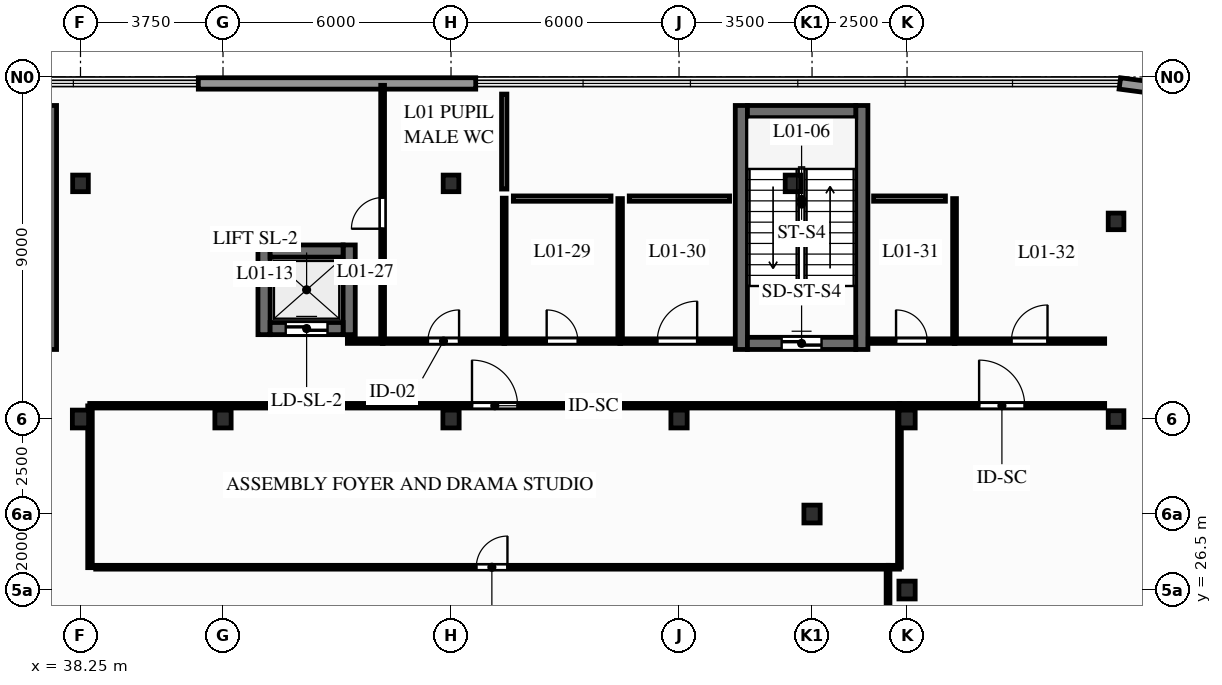
"""IFC4 building model, lengths in metres.
Left out: names, types, materials, properties, quantities, classifications, styles, units other than length and angle.
Written with IfcOpenShell. Run it as: python <this file> out.ifc"""

import sys

from ifc_helpers import new_model, si_unit, direction, frame, frame_2d, origin, origin_2d, place, context, subcontext, project, spatial, rectangle, i_section, extrude, element, fill, save


model = new_model("IFC4")
c1 = context("Model", 3, precision=1e-05, world=origin(), true_north=direction((0.0, 1.0)))
c2 = subcontext(c1, "Body", "Model", "MODEL_VIEW")
j1 = project(units=[si_unit("LENGTHUNIT", "METRE"), si_unit("PLANEANGLEUNIT", "RADIAN")], contexts=[c1])
p1 = place(None, origin())
s1 = spatial("IfcSite", under=j1, at=p1, CompositionType="ELEMENT")
p2 = place(p1, origin())
s2 = spatial("IfcBuilding", under=s1, at=p2, CompositionType="ELEMENT")
p3 = place(p2, frame((0.0, 0.0, 4.5)))
s3 = spatial("IfcBuildingStorey", under=s2, at=p3, CompositionType="ELEMENT", Elevation=4.5)
p4 = place(p3, frame((38.25, 31.0, 0.0), z_axis=(0.0, 0.0, 1.0), x_axis=(1.0, 0.0, 0.0)))
e1 = element("IfcColumn", 1, at=p4, inside=s3, PredefinedType="COLUMN", context=c2, shape_type="SweptSolid", body=[
    extrude(i_section(OverallWidth=0.428, OverallDepth=0.469, WebThickness=0.078, FlangeThickness=0.125, FilletRadius=0.015, at=origin_2d()), origin(), (0.0, 0.0, 1.0), 4.5),
])
p5 = place(p3, frame((38.25, 37.2, 0.0), z_axis=(0.0, 0.0, 1.0), x_axis=(1.0, 0.0, 0.0)))
e2 = element("IfcColumn", 2, at=p5, inside=s3, PredefinedType="COLUMN", context=c2, shape_type="SweptSolid", body=[
    extrude(i_section(OverallWidth=0.412, OverallDepth=0.437, WebThickness=0.036, FlangeThickness=0.058, FilletRadius=0.015, at=origin_2d()), origin(), (0.0, 0.0, 1.0), 4.5),
])
for number, where, z_axis, x_axis in (
    (3, (42.0, 31.0, 0.0), (0.0, 0.0, 1.0), (1.0, 0.0, 0.0)),
    (4, (48.0, 31.0, 0.0), (0.0, 0.0, 1.0), (1.0, 0.0, 0.0)),
):
    element("IfcColumn", number, at=place(p3, frame(where, z_axis=z_axis, x_axis=x_axis)), inside=s3, PredefinedType="COLUMN", context=c2, shape_type="SweptSolid", body=[
        extrude(i_section(OverallWidth=0.428, OverallDepth=0.469, WebThickness=0.078, FlangeThickness=0.125, FilletRadius=0.015, at=origin_2d()), origin(), (0.0, 0.0, 1.0), 4.5),
    ])
p6 = place(p3, frame((48.0, 37.2, 0.0), z_axis=(0.0, 0.0, 1.0), x_axis=(1.0, 0.0, 0.0)))
e5 = element("IfcColumn", 5, at=p6, inside=s3, PredefinedType="COLUMN", context=c2, shape_type="SweptSolid", body=[
    extrude(i_section(OverallWidth=0.412, OverallDepth=0.437, WebThickness=0.036, FlangeThickness=0.058, FilletRadius=0.015, at=origin_2d()), origin(), (0.0, 0.0, 1.0), 4.5),
])
p7 = place(p3, frame((54.0, 31.0, 0.0), z_axis=(0.0, 0.0, 1.0), x_axis=(1.0, 0.0, 0.0)))
e6 = element("IfcColumn", 6, at=p7, inside=s3, PredefinedType="COLUMN", context=c2, shape_type="SweptSolid", body=[
    extrude(i_section(OverallWidth=0.428, OverallDepth=0.469, WebThickness=0.078, FlangeThickness=0.125, FilletRadius=0.015, at=origin_2d()), origin(), (0.0, 0.0, 1.0), 4.5),
])
p8 = place(p3, frame((57.0, 37.2, 0.0), z_axis=(0.0, 0.0, 1.0), x_axis=(1.0, 0.0, 0.0)))
e7 = element("IfcColumn", 7, at=p8, inside=s3, PredefinedType="COLUMN", context=c2, shape_type="SweptSolid", body=[
    extrude(i_section(OverallWidth=0.412, OverallDepth=0.437, WebThickness=0.036, FlangeThickness=0.058, FilletRadius=0.015, at=origin_2d()), origin(), (0.0, 0.0, 1.0), 4.5),
])
for number, where, z_axis, x_axis in (
    (8, (57.5, 28.5, 0.0), (0.0, 0.0, 1.0), (1.0, 0.0, 0.0)),
    (9, (60.0, 26.5, 0.0), (0.0, 0.0, 1.0), (1.0, 0.0, 0.0)),
    (10, (60.0, 31.0, 0.0), (0.0, 0.0, 1.0), (1.0, 0.0, 0.0)),
):
    element("IfcColumn", number, at=place(p3, frame(where, z_axis=z_axis, x_axis=x_axis)), inside=s3, PredefinedType="COLUMN", context=c2, shape_type="SweptSolid", body=[
        extrude(i_section(OverallWidth=0.428, OverallDepth=0.469, WebThickness=0.078, FlangeThickness=0.125, FilletRadius=0.015, at=origin_2d()), origin(), (0.0, 0.0, 1.0), 4.5),
    ])
for number, where, z_axis, x_axis in (
    (11, (65.5, 31.0, 0.0), (0.0, 0.0, 1.0), (1.0, 0.0, 0.0)),
    (12, (65.5, 36.2, 0.0), (0.0, 0.0, 1.0), (1.0, 0.0, 0.0)),
):
    element("IfcColumn", number, at=place(p3, frame(where, z_axis=z_axis, x_axis=x_axis)), inside=s3, PredefinedType="COLUMN", context=c2, shape_type="SweptSolid", body=[
        extrude(i_section(OverallWidth=0.412, OverallDepth=0.437, WebThickness=0.036, FlangeThickness=0.058, FilletRadius=0.015, at=origin_2d()), origin(), (0.0, 0.0, 1.0), 4.5),
    ])
p9 = place(p3, frame((65.6, 39.83, 0.0), z_axis=(0.0, 0.0, 1.0), x_axis=(0.991442117533, -0.13054703207, 0.0)))
e13 = element("IfcWall", 13, at=p9, inside=s3, PredefinedType="STANDARD", context=c2, shape_type="SweptSolid", body=[
    extrude(rectangle(XDim=1.365, YDim=0.3, at=frame_2d((0.683, 0.0))), origin(), (0.0, 0.0, 1.0), 4.22),
])
p10 = place(p3, frame((41.35, 39.83, 0.0), z_axis=(0.0, 0.0, 1.0), x_axis=(1.0, 0.0, 0.0)))
e14 = element("IfcWall", 14, at=p10, inside=s3, PredefinedType="STANDARD", context=c2, shape_type="SweptSolid", body=[
    extrude(rectangle(XDim=7.3, YDim=0.3, at=frame_2d((3.65, 0.0))), origin(), (0.0, 0.0, 1.0), 4.22),
])
for number, where, z_axis, x_axis in (
    (15, (37.46, 32.83, 0.0), (0.0, 0.0, 1.0), (0.0, 1.0, 0.0)),
    (16, (55.64, 32.83, 0.0), (0.0, 0.0, 1.0), (0.0, 1.0, 0.0)),
    (17, (58.81, 32.83, 0.0), (0.0, 0.0, 1.0), (0.0, 1.0, 0.0)),
):
    element("IfcWall", number, at=place(p3, frame(where, z_axis=z_axis, x_axis=x_axis)), inside=s3, PredefinedType="SHEAR", context=c2, shape_type="SweptSolid", body=[
        extrude(rectangle(XDim=6.42, YDim=0.32, at=frame_2d((3.21, 0.0))), origin(), (0.0, 0.0, 1.0), 4.22),
    ])
p11 = place(p3, frame((55.8, 32.99, 0.0), z_axis=(0.0, 0.0, 1.0), x_axis=(1.0, 0.0, 0.0)))
e18 = element("IfcWall", 18, at=p11, inside=s3, PredefinedType="SHEAR", context=c2, shape_type="SweptSolid", body=[
    extrude(rectangle(XDim=2.85, YDim=0.32, at=frame_2d((1.425, 0.0))), origin(), (0.0, 0.0, 1.0), 4.22),
])
p12 = place(p11, frame((0.9, 0.0, 0.0)))
e19 = element("IfcOpeningElement", 19, at=p12, cuts=e18, PredefinedType="OPENING", context=c2, shape_type="SweptSolid", body=[
    extrude(rectangle(XDim=1.05, YDim=2.06, at=frame_2d((0.525, 1.03))), frame((0.0, 0.17, 0.0), z_axis=(0.0, -1.0, 0.0), x_axis=(1.0, 0.0, 0.0)), (0.0, 0.0, 1.0), 0.34),
])
p13 = place(p3, frame((58.65, 39.09, 0.0), z_axis=(0.0, 0.0, 1.0), x_axis=(-1.0, 0.0, 0.0)))
e20 = element("IfcWall", 20, at=p13, inside=s3, PredefinedType="SHEAR", context=c2, shape_type="SweptSolid", body=[
    extrude(rectangle(XDim=2.85, YDim=0.32, at=frame_2d((1.425, 0.0))), origin(), (0.0, 0.0, 1.0), 4.22),
])
for number, where, z_axis, x_axis in (
    (21, (43.08, 33.22, 0.0), (0.0, 0.0, 1.0), (0.0, 1.0, 0.0)),
    (22, (45.32, 33.22, 0.0), (0.0, 0.0, 1.0), (0.0, 1.0, 0.0)),
):
    element("IfcWall", number, at=place(p3, frame(where, z_axis=z_axis, x_axis=x_axis)), inside=s3, PredefinedType="SHEAR", context=c2, shape_type="SweptSolid", body=[
        extrude(rectangle(XDim=2.36, YDim=0.32, at=frame_2d((1.18, 0.0))), origin(), (0.0, 0.0, 1.0), 4.22),
    ])
p14 = place(p3, frame((43.24, 33.38, 0.0), z_axis=(0.0, 0.0, 1.0), x_axis=(1.0, 0.0, 0.0)))
e23 = element("IfcWall", 23, at=p14, inside=s3, PredefinedType="SHEAR", context=c2, shape_type="SweptSolid", body=[
    extrude(rectangle(XDim=1.92, YDim=0.32, at=frame_2d((0.96, 0.0))), origin(), (0.0, 0.0, 1.0), 4.22),
])
p15 = place(p14, frame((0.41, 0.0, 0.0)))
e24 = element("IfcOpeningElement", 24, at=p15, cuts=e23, PredefinedType="OPENING", context=c2, shape_type="SweptSolid", body=[
    extrude(rectangle(XDim=1.1, YDim=2.06, at=frame_2d((0.55, 1.03))), frame((0.0, 0.17, 0.0), z_axis=(0.0, -1.0, 0.0), x_axis=(1.0, 0.0, 0.0)), (0.0, 0.0, 1.0), 0.34),
])
p16 = place(p3, frame((43.24, 35.42, 0.0), z_axis=(0.0, 0.0, 1.0), x_axis=(1.0, 0.0, 0.0)))
e25 = element("IfcWall", 25, at=p16, inside=s3, PredefinedType="SHEAR", context=c2, shape_type="SweptSolid", body=[
    extrude(rectangle(XDim=1.92, YDim=0.32, at=frame_2d((0.96, 0.0))), origin(), (0.0, 0.0, 1.0), 4.22),
])
p17 = place(p3, frame((45.273, 33.05, 0.0), z_axis=(0.0, 0.0, 1.0), x_axis=(1.0, 0.0, 0.0)))
e26 = element("IfcWall", 26, at=p17, inside=s3, PredefinedType="PARTITIONING", context=c2, shape_type="SweptSolid", body=[
    extrude(rectangle(XDim=0.938, YDim=0.12, at=frame_2d((0.469, 0.0))), origin(), (0.0, 0.0, 1.0), 4.22),
])
p18 = place(p3, frame((46.193, 33.05, 0.0), z_axis=(0.0, 0.0, 1.0), x_axis=(1.0, 0.0, 0.0)))
e27 = element("IfcWall", 27, at=p18, inside=s3, PredefinedType="PARTITIONING", context=c2, shape_type="SweptSolid", body=[
    extrude(rectangle(XDim=3.219, YDim=0.12, at=frame_2d((1.609, 0.0))), origin(), (0.0, 0.0, 1.0), 3.268),
])
p19 = place(p18, frame((1.199, 0.0, 0.0)))
e28 = element("IfcOpeningElement", 28, at=p19, cuts=e27, PredefinedType="OPENING", context=c2, shape_type="SweptSolid", body=[
    extrude(rectangle(XDim=0.82, YDim=2.02, at=frame_2d((0.41, 1.01))), frame((0.0, 0.07, 0.0), z_axis=(0.0, -1.0, 0.0), x_axis=(1.0, 0.0, 0.0)), (0.0, 0.0, 1.0), 0.14),
])
p20 = place(p3, frame((49.393, 33.05, 0.0), z_axis=(0.0, 0.0, 1.0), x_axis=(1.0, 0.0, 0.0)))
e29 = element("IfcWall", 29, at=p20, inside=s3, PredefinedType="PARTITIONING", context=c2, shape_type="SweptSolid", body=[
    extrude(rectangle(XDim=3.069, YDim=0.12, at=frame_2d((1.534, 0.0))), origin(), (0.0, 0.0, 1.0), 4.22),
])
p21 = place(p20, frame((1.124, 0.0, 0.0)))
e30 = element("IfcOpeningElement", 30, at=p21, cuts=e29, PredefinedType="OPENING", context=c2, shape_type="SweptSolid", body=[
    extrude(rectangle(XDim=0.82, YDim=2.02, at=frame_2d((0.41, 1.01))), frame((0.0, 0.07, 0.0), z_axis=(0.0, -1.0, 0.0), x_axis=(1.0, 0.0, 0.0)), (0.0, 0.0, 1.0), 0.14),
])
p22 = place(p3, frame((52.443, 33.05, 0.0), z_axis=(0.0, 0.0, 1.0), x_axis=(1.0, 0.0, 0.0)))
e31 = element("IfcWall", 31, at=p22, inside=s3, PredefinedType="PARTITIONING", context=c2, shape_type="SweptSolid", body=[
    extrude(rectangle(XDim=3.019, YDim=0.12, at=frame_2d((1.509, 0.0))), origin(), (0.0, 0.0, 1.0), 4.22),
])
p23 = place(p22, frame((0.984, 0.0, 0.0)))
e32 = element("IfcOpeningElement", 32, at=p23, cuts=e31, PredefinedType="OPENING", context=c2, shape_type="SweptSolid", body=[
    extrude(rectangle(XDim=1.05, YDim=2.06, at=frame_2d((0.525, 1.03))), frame((0.0, 0.07, 0.0), z_axis=(0.0, -1.0, 0.0), x_axis=(1.0, 0.0, 0.0)), (0.0, 0.0, 1.0), 0.14),
])
p24 = place(p3, frame((58.98, 33.05, 0.0), z_axis=(0.0, 0.0, 1.0), x_axis=(1.0, 0.0, 0.0)))
e33 = element("IfcWall", 33, at=p24, inside=s3, PredefinedType="PARTITIONING", context=c2, shape_type="SweptSolid", body=[
    extrude(rectangle(XDim=2.281, YDim=0.12, at=frame_2d((1.141, 0.0))), origin(), (0.0, 0.0, 1.0), 4.22),
])
p25 = place(p24, frame((0.731, 0.0, 0.0)))
e34 = element("IfcOpeningElement", 34, at=p25, cuts=e33, PredefinedType="OPENING", context=c2, shape_type="SweptSolid", body=[
    extrude(rectangle(XDim=0.82, YDim=2.02, at=frame_2d((0.41, 1.01))), frame((0.0, 0.07, 0.0), z_axis=(0.0, -1.0, 0.0), x_axis=(1.0, 0.0, 0.0)), (0.0, 0.0, 1.0), 0.14),
])
p26 = place(p3, frame((61.243, 33.05, 0.0), z_axis=(0.0, 0.0, 1.0), x_axis=(1.0, 0.0, 0.0)))
e35 = element("IfcWall", 35, at=p26, inside=s3, PredefinedType="PARTITIONING", context=c2, shape_type="SweptSolid", body=[
    extrude(rectangle(XDim=3.957, YDim=0.12, at=frame_2d((1.979, 0.0))), origin(), (0.0, 0.0, 1.0), 4.22),
])
p27 = place(p26, frame((1.504, 0.0, 0.0)))
e36 = element("IfcOpeningElement", 36, at=p27, cuts=e35, PredefinedType="OPENING", context=c2, shape_type="SweptSolid", body=[
    extrude(rectangle(XDim=0.95, YDim=2.05, at=frame_2d((0.475, 1.025))), frame((0.0, 0.07, 0.0), z_axis=(0.0, -1.0, 0.0), x_axis=(1.0, 0.0, 0.0)), (0.0, 0.0, 1.0), 0.14),
])
p28 = place(p3, frame((38.493, 31.35, 0.0), z_axis=(0.0, 0.0, 1.0), x_axis=(1.0, 0.0, 0.0)))
e37 = element("IfcWall", 37, at=p28, inside=s3, PredefinedType="PARTITIONING", context=c2, shape_type="SweptSolid", body=[
    extrude(rectangle(XDim=21.319, YDim=0.12, at=frame_2d((10.659, 0.0))), origin(), (0.0, 0.0, 1.0), 3.268),
])
p29 = place(p28, frame((10.059, 0.0, 0.0)))
e38 = element("IfcOpeningElement", 38, at=p29, cuts=e37, PredefinedType="OPENING", context=c2, shape_type="SweptSolid", body=[
    extrude(rectangle(XDim=1.2, YDim=2.08, at=frame_2d((0.6, 1.04))), frame((0.0, 0.07, 0.0), z_axis=(0.0, -1.0, 0.0), x_axis=(1.0, 0.0, 0.0)), (0.0, 0.0, 1.0), 0.14),
])
p30 = place(p3, frame((59.793, 31.35, 0.0), z_axis=(0.0, 0.0, 1.0), x_axis=(1.0, 0.0, 0.0)))
e39 = element("IfcWall", 39, at=p30, inside=s3, PredefinedType="PARTITIONING", context=c2, shape_type="SweptSolid", body=[
    extrude(rectangle(XDim=5.407, YDim=0.12, at=frame_2d((2.704, 0.0))), origin(), (0.0, 0.0, 1.0), 4.22),
])
p31 = place(p30, frame((2.104, 0.0, 0.0)))
e40 = element("IfcOpeningElement", 40, at=p31, cuts=e39, PredefinedType="OPENING", context=c2, shape_type="SweptSolid", body=[
    extrude(rectangle(XDim=1.2, YDim=2.08, at=frame_2d((0.6, 1.04))), frame((0.0, 0.07, 0.0), z_axis=(0.0, -1.0, 0.0), x_axis=(1.0, 0.0, 0.0)), (0.0, 0.0, 1.0), 0.14),
])
p32 = place(p3, frame((38.5, 27.089, 0.0), z_axis=(0.0, 0.0, 1.0), x_axis=(0.0, 1.0, 0.0)))
e41 = element("IfcWall", 41, at=p32, inside=s3, PredefinedType="PARTITIONING", context=c2, shape_type="SweptSolid", body=[
    extrude(rectangle(XDim=4.257, YDim=0.12, at=frame_2d((2.129, 0.0))), origin(), (0.0, 0.0, 1.0), 3.268),
])
p33 = place(p3, frame((46.2, 33.054, 0.0), z_axis=(0.0, 0.0, 1.0), x_axis=(0.0, 1.0, 0.0)))
e42 = element("IfcWall", 42, at=p33, inside=s3, PredefinedType="PARTITIONING", context=c2, shape_type="SweptSolid", body=[
    extrude(rectangle(XDim=6.726, YDim=0.1, at=frame_2d((3.363, 0.0))), origin(), (0.0, 0.0, 1.0), 3.583),
])
p34 = place(p33, frame((2.953, 0.0, 0.0)))
e43 = element("IfcOpeningElement", 43, at=p34, cuts=e42, PredefinedType="OPENING", context=c2, shape_type="SweptSolid", body=[
    extrude(rectangle(XDim=0.82, YDim=2.02, at=frame_2d((0.41, 1.01))), frame((0.0, 0.06, 0.0), z_axis=(0.0, -1.0, 0.0), x_axis=(1.0, 0.0, 0.0)), (0.0, 0.0, 1.0), 0.12),
])
p35 = place(p3, frame((49.4, 33.054, 0.0), z_axis=(0.0, 0.0, 1.0), x_axis=(0.0, 1.0, 0.0)))
e44 = element("IfcWall", 44, at=p35, inside=s3, PredefinedType="PARTITIONING", context=c2, shape_type="SweptSolid", body=[
    extrude(rectangle(XDim=3.757, YDim=0.1, at=frame_2d((1.879, 0.0))), origin(), (0.0, 0.0, 1.0), 4.22),
])
p36 = place(p3, frame((52.45, 33.054, 0.0), z_axis=(0.0, 0.0, 1.0), x_axis=(0.0, 1.0, 0.0)))
e45 = element("IfcWall", 45, at=p36, inside=s3, PredefinedType="PARTITIONING", context=c2, shape_type="SweptSolid", body=[
    extrude(rectangle(XDim=3.746, YDim=0.12, at=frame_2d((1.873, 0.0))), origin(), (0.0, 0.0, 1.0), 4.22),
])
p37 = place(p3, frame((61.25, 33.054, 0.0), z_axis=(0.0, 0.0, 1.0), x_axis=(0.0, 1.0, 0.0)))
e46 = element("IfcWall", 46, at=p37, inside=s3, PredefinedType="PARTITIONING", context=c2, shape_type="SweptSolid", body=[
    extrude(rectangle(XDim=3.746, YDim=0.1, at=frame_2d((1.873, 0.0))), origin(), (0.0, 0.0, 1.0), 4.22),
])
p38 = place(p3, frame((38.65, 27.1, 0.0), z_axis=(0.0, 0.0, 1.0), x_axis=(1.0, 0.0, 0.0)))
e47 = element("IfcWall", 47, at=p38, inside=s3, PredefinedType="PARTITIONING", context=c2, shape_type="SweptSolid", body=[
    extrude(rectangle(XDim=20.85, YDim=0.1, at=frame_2d((10.425, 0.0))), origin(), (0.0, 0.0, 1.0), 4.22),
])
p39 = place(p38, frame((10.015, 0.0, 0.0)))
e48 = element("IfcOpeningElement", 48, at=p39, cuts=e47, PredefinedType="OPENING", context=c2, shape_type="SweptSolid", body=[
    extrude(rectangle(XDim=0.82, YDim=2.02, at=frame_2d((0.41, 1.01))), frame((0.0, 0.06, 0.0), z_axis=(0.0, -1.0, 0.0), x_axis=(1.0, 0.0, 0.0)), (0.0, 0.0, 1.0), 0.12),
])
p40 = place(p3, frame((59.5, 12.6, 0.0), z_axis=(0.0, 0.0, 1.0), x_axis=(0.0, 1.0, 0.0)))
e49 = element("IfcWall", 49, at=p40, inside=s3, PredefinedType="PARTITIONING", context=c2, shape_type="SweptSolid", body=[
    extrude(rectangle(XDim=14.5, YDim=0.1, at=frame_2d((7.25, 0.0))), origin(), (0.0, 0.0, 1.0), 4.22),
])
p41 = place(p3, frame((59.504, 27.1, 0.0), z_axis=(0.0, 0.0, 1.0), x_axis=(1.0, 0.0, 0.0)))
e50 = element("IfcWall", 50, at=p41, inside=s3, PredefinedType="PARTITIONING", context=c2, shape_type="SweptSolid", body=[
    extrude(rectangle(XDim=0.296, YDim=0.1, at=frame_2d((0.148, 0.0))), origin(), (0.0, 0.0, 1.0), 4.22),
])
p42 = place(p3, frame((59.8, 27.1, 0.0), z_axis=(0.0, 0.0, 1.0), x_axis=(0.0, 1.0, 0.0)))
e51 = element("IfcWall", 51, at=p42, inside=s3, PredefinedType="PARTITIONING", context=c2, shape_type="SweptSolid", body=[
    extrude(rectangle(XDim=4.246, YDim=0.1, at=frame_2d((2.123, 0.0))), origin(), (0.0, 0.0, 1.0), 3.583),
])
p43 = place(p3, frame((49.4, 37.051, 0.0), z_axis=(0.0, 0.0, 1.0), x_axis=(0.0, 1.0, 0.0)))
e52 = element("IfcWall", 52, at=p43, inside=s3, PredefinedType="PARTITIONING", context=c2, shape_type="SweptSolid", body=[
    extrude(rectangle(XDim=2.499, YDim=0.14, at=frame_2d((1.25, 0.0))), origin(), (0.0, 0.0, 1.0), 4.22),
])
p44 = place(p3, frame((49.64, 36.8, 0.0), z_axis=(0.0, 0.0, 1.0), x_axis=(1.0, 0.0, 0.0)))
e53 = element("IfcWall", 53, at=p44, inside=s3, PredefinedType="PARTITIONING", context=c2, shape_type="SweptSolid", body=[
    extrude(rectangle(XDim=2.57, YDim=0.14, at=frame_2d((1.285, 0.0))), origin(), (0.0, 0.0, 1.0), 4.22),
])
p45 = place(p3, frame((52.69, 36.8, 0.0), z_axis=(0.0, 0.0, 1.0), x_axis=(1.0, 0.0, 0.0)))
e54 = element("IfcWall", 54, at=p45, inside=s3, PredefinedType="PARTITIONING", context=c2, shape_type="SweptSolid", body=[
    extrude(rectangle(XDim=2.64, YDim=0.14, at=frame_2d((1.32, 0.0))), origin(), (0.0, 0.0, 1.0), 4.22),
])
p46 = place(p3, frame((59.12, 36.8, 0.0), z_axis=(0.0, 0.0, 1.0), x_axis=(1.0, 0.0, 0.0)))
e55 = element("IfcWall", 55, at=p46, inside=s3, PredefinedType="PARTITIONING", context=c2, shape_type="SweptSolid", body=[
    extrude(rectangle(XDim=1.89, YDim=0.14, at=frame_2d((0.945, 0.0))), origin(), (0.0, 0.0, 1.0), 4.22),
])
p47 = place(p12, origin())
e56 = element("IfcDoor", 56, at=p47, inside=s3, OperationType="SINGLE_SWING_RIGHT", PredefinedType="DOOR", context=c2, shape_type="SweptSolid", body=[
    extrude(rectangle(XDim=1.05, YDim=2.06, at=frame_2d((0.525, 1.03))), frame((0.0, 0.025, 0.0), z_axis=(0.0, -1.0, 0.0), x_axis=(1.0, 0.0, 0.0)), (0.0, 0.0, 1.0), 0.05),
])
fill(e19, e56)
p48 = place(p15, origin())
e57 = element("IfcDoor", 57, at=p48, inside=s3, OperationType="SLIDING_TO_RIGHT", PredefinedType="DOOR", context=c2, shape_type="SweptSolid", body=[
    extrude(rectangle(XDim=1.1, YDim=2.06, at=frame_2d((0.55, 1.03))), frame((0.0, 0.025, 0.0), z_axis=(0.0, -1.0, 0.0), x_axis=(1.0, 0.0, 0.0)), (0.0, 0.0, 1.0), 0.05),
])
fill(e24, e57)
p49 = place(p19, origin())
e58 = element("IfcDoor", 58, at=p49, inside=s3, OperationType="SINGLE_SWING_RIGHT", PredefinedType="DOOR", context=c2, shape_type="SweptSolid", body=[
    extrude(rectangle(XDim=0.82, YDim=2.02, at=frame_2d((0.41, 1.01))), frame((0.0, 0.025, 0.0), z_axis=(0.0, -1.0, 0.0), x_axis=(1.0, 0.0, 0.0)), (0.0, 0.0, 1.0), 0.05),
])
fill(e28, e58)
p50 = place(p21, origin())
e59 = element("IfcDoor", 59, at=p50, inside=s3, OperationType="SINGLE_SWING_LEFT", PredefinedType="DOOR", context=c2, shape_type="SweptSolid", body=[
    extrude(rectangle(XDim=0.82, YDim=2.02, at=frame_2d((0.41, 1.01))), frame((0.0, 0.025, 0.0), z_axis=(0.0, -1.0, 0.0), x_axis=(1.0, 0.0, 0.0)), (0.0, 0.0, 1.0), 0.05),
])
fill(e30, e59)
p51 = place(p23, origin())
e60 = element("IfcDoor", 60, at=p51, inside=s3, OperationType="SINGLE_SWING_RIGHT", PredefinedType="DOOR", context=c2, shape_type="SweptSolid", body=[
    extrude(rectangle(XDim=1.05, YDim=2.06, at=frame_2d((0.525, 1.03))), frame((0.0, 0.025, 0.0), z_axis=(0.0, -1.0, 0.0), x_axis=(1.0, 0.0, 0.0)), (0.0, 0.0, 1.0), 0.05),
])
fill(e32, e60)
p52 = place(p25, origin())
e61 = element("IfcDoor", 61, at=p52, inside=s3, OperationType="SINGLE_SWING_LEFT", PredefinedType="DOOR", context=c2, shape_type="SweptSolid", body=[
    extrude(rectangle(XDim=0.82, YDim=2.02, at=frame_2d((0.41, 1.01))), frame((0.0, 0.025, 0.0), z_axis=(0.0, -1.0, 0.0), x_axis=(1.0, 0.0, 0.0)), (0.0, 0.0, 1.0), 0.05),
])
fill(e34, e61)
p53 = place(p27, origin())
e62 = element("IfcDoor", 62, at=p53, inside=s3, OperationType="SINGLE_SWING_RIGHT", PredefinedType="DOOR", context=c2, shape_type="SweptSolid", body=[
    extrude(rectangle(XDim=0.95, YDim=2.05, at=frame_2d((0.475, 1.025))), frame((0.0, 0.025, 0.0), z_axis=(0.0, -1.0, 0.0), x_axis=(1.0, 0.0, 0.0)), (0.0, 0.0, 1.0), 0.05),
])
fill(e36, e62)
p54 = place(p29, origin())
e63 = element("IfcDoor", 63, at=p54, inside=s3, OperationType="SINGLE_SWING_LEFT", PredefinedType="DOOR", context=c2, shape_type="SweptSolid", body=[
    extrude(rectangle(XDim=1.2, YDim=2.08, at=frame_2d((0.6, 1.04))), frame((0.0, 0.025, 0.0), z_axis=(0.0, -1.0, 0.0), x_axis=(1.0, 0.0, 0.0)), (0.0, 0.0, 1.0), 0.05),
])
fill(e38, e63)
p55 = place(p31, origin())
e64 = element("IfcDoor", 64, at=p55, inside=s3, OperationType="SINGLE_SWING_LEFT", PredefinedType="DOOR", context=c2, shape_type="SweptSolid", body=[
    extrude(rectangle(XDim=1.2, YDim=2.08, at=frame_2d((0.6, 1.04))), frame((0.0, 0.025, 0.0), z_axis=(0.0, -1.0, 0.0), x_axis=(1.0, 0.0, 0.0)), (0.0, 0.0, 1.0), 0.05),
])
fill(e40, e64)
p56 = place(p34, origin())
e65 = element("IfcDoor", 65, at=p56, inside=s3, OperationType="SINGLE_SWING_LEFT", PredefinedType="DOOR", context=c2, shape_type="SweptSolid", body=[
    extrude(rectangle(XDim=0.82, YDim=2.02, at=frame_2d((0.41, 1.01))), frame((0.0, 0.025, 0.0), z_axis=(0.0, -1.0, 0.0), x_axis=(1.0, 0.0, 0.0)), (0.0, 0.0, 1.0), 0.05),
])
fill(e43, e65)
p57 = place(p39, origin())
e66 = element("IfcDoor", 66, at=p57, inside=s3, OperationType="SINGLE_SWING_RIGHT", PredefinedType="DOOR", context=c2, shape_type="SweptSolid", body=[
    extrude(rectangle(XDim=0.82, YDim=2.02, at=frame_2d((0.41, 1.01))), frame((0.0, 0.025, 0.0), z_axis=(0.0, -1.0, 0.0), x_axis=(1.0, 0.0, 0.0)), (0.0, 0.0, 1.0), 0.05),
])
fill(e48, e66)
save(model, sys.argv[1])
